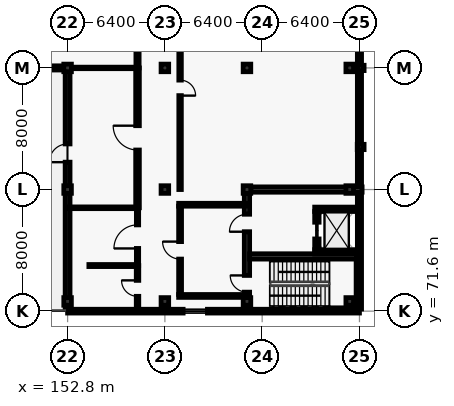
"""IFC4 building model, lengths in metres.
Left out: names, types, materials, properties, quantities, classifications, styles, units other than length and angle.
Written with IfcOpenShell. Run it as: python <this file> out.ifc"""

import sys

from ifc_helpers import new_model, si_unit, direction, frame, frame_2d, origin, origin_2d, place, context, subcontext, project, spatial, rectangle, extrude, element, fill, save


model = new_model("IFC4")
c1 = context("Model", 3, precision=1e-05, world=origin(), true_north=direction((0.0, 1.0)))
c2 = subcontext(c1, "Body", "Model", "MODEL_VIEW")
j1 = project(units=[si_unit("LENGTHUNIT", "METRE"), si_unit("PLANEANGLEUNIT", "RADIAN")], contexts=[c1])
p1 = place(None, origin())
s1 = spatial("IfcSite", under=j1, at=p1, CompositionType="ELEMENT")
p2 = place(p1, origin())
s2 = spatial("IfcBuilding", under=s1, at=p2, CompositionType="ELEMENT")
p3 = place(p2, frame((0.0, 0.0, 20.4)))
s3 = spatial("IfcBuildingStorey", under=s2, at=p3, CompositionType="ELEMENT", Elevation=20.4)
for number, where, z_axis, x_axis in (
    (1, (152.8, 72.24, 0.0), (0.0, 0.0, 1.0), (1.0, 0.0, 0.0)),
    (2, (152.8, 79.6, 0.0), (0.0, 0.0, 1.0), (1.0, 0.0, 0.0)),
    (3, (152.8, 87.6, 0.0), (0.0, 0.0, 1.0), (1.0, 0.0, 0.0)),
    (4, (159.2, 72.24, 0.0), (0.0, 0.0, 1.0), (1.0, 0.0, 0.0)),
    (5, (159.2, 79.6, 0.0), (0.0, 0.0, 1.0), (1.0, 0.0, 0.0)),
    (6, (159.2, 87.6, 0.0), (0.0, 0.0, 1.0), (1.0, 0.0, 0.0)),
    (7, (164.6, 72.24, 0.0), (0.0, 0.0, 1.0), (1.0, 0.0, 0.0)),
    (8, (164.6, 79.6, 0.0), (0.0, 0.0, 1.0), (1.0, 0.0, 0.0)),
    (9, (164.6, 87.6, 0.0), (0.0, 0.0, 1.0), (1.0, 0.0, 0.0)),
    (10, (171.36, 72.24, 0.0), (0.0, 0.0, 1.0), (1.0, 0.0, 0.0)),
    (11, (171.36, 79.6, 0.0), (0.0, 0.0, 1.0), (1.0, 0.0, 0.0)),
    (12, (171.36, 87.6, 0.0), (0.0, 0.0, 1.0), (1.0, 0.0, 0.0)),
):
    element("IfcColumn", number, at=place(p3, frame(where, z_axis=z_axis, x_axis=x_axis)), inside=s3, PredefinedType="COLUMN", context=c2, shape_type="SweptSolid", body=[
        extrude(rectangle(XDim=0.5, YDim=0.5, at=origin_2d()), origin(), (0.0, 0.0, 1.0), 4.5),
    ])
for number, where, z_axis, x_axis in (
    (13, (172.08, 82.4, 0.0), (0.0, 0.0, 1.0), (1.0, 0.0, 0.0)),
    (14, (172.08, 87.6, 0.0), (0.0, 0.0, 1.0), (1.0, 0.0, 0.0)),
):
    element("IfcColumn", number, at=place(p3, frame(where, z_axis=z_axis, x_axis=x_axis)), inside=s3, PredefinedType="PILASTER", context=c2, shape_type="SweptSolid", body=[
        extrude(rectangle(XDim=0.35, YDim=0.45, at=origin_2d()), origin(), (0.0, 0.0, 1.0), 4.5),
    ])
p4 = place(p3, frame((152.8, 87.6, 0.0), z_axis=(0.0, 0.0, 1.0), x_axis=(-1.0, 0.0, 0.0)))
e15 = element("IfcWall", 15, at=p4, inside=s3, PredefinedType="SOLIDWALL", context=c2, shape_type="SweptSolid", body=[
    extrude(rectangle(XDim=6.6, YDim=0.275, at=frame_2d((3.3, 0.0))), origin(), (0.0, 0.0, 1.0), 3.65),
])
p5 = place(p3, frame((172.0, 117.86, 0.0), z_axis=(0.0, 0.0, 1.0), x_axis=(0.0, -1.0, 0.0)))
e16 = element("IfcWall", 16, at=p5, inside=s3, PredefinedType="SOLIDWALL", context=c2, shape_type="SweptSolid", body=[
    extrude(rectangle(XDim=46.12, YDim=0.275, at=frame_2d((23.06, 0.0))), origin(), (0.0, 0.0, 1.0), 4.3),
])
p6 = place(p3, frame((172.0, 71.6, 0.0), z_axis=(0.0, 0.0, 1.0), x_axis=(-1.0, 0.0, 0.0)))
e17 = element("IfcWall", 17, at=p6, inside=s3, PredefinedType="SOLIDWALL", context=c2, shape_type="SweptSolid", body=[
    extrude(rectangle(XDim=19.2, YDim=0.25, at=frame_2d((9.6, 0.0))), origin(), (0.0, 0.0, 1.0), 4.3),
])
p7 = place(p6, frame((10.0, 0.0, 0.8)))
e18 = element("IfcOpeningElement", 18, at=p7, cuts=e17, PredefinedType="OPENING", context=c2, shape_type="SweptSolid", body=[
    extrude(rectangle(XDim=1.6, YDim=2.75, at=frame_2d((0.8, 1.375))), frame((0.0, 0.135, 0.0), z_axis=(0.0, -1.0, 0.0), x_axis=(1.0, 0.0, 0.0)), (0.0, 0.0, 1.0), 0.27),
])
p8 = place(p3, frame((152.8, 71.74, 0.0), z_axis=(0.0, 0.0, 1.0), x_axis=(0.0, 1.0, 0.0)))
e19 = element("IfcWall", 19, at=p8, inside=s3, PredefinedType="SOLIDWALL", context=c2, shape_type="SweptSolid", body=[
    extrude(rectangle(XDim=15.72, YDim=0.32, at=frame_2d((7.86, 0.0))), origin(), (0.0, 0.0, 1.0), 3.45),
])
p9 = place(p8, frame((9.66, 0.0, 0.0)))
e20 = element("IfcOpeningElement", 20, at=p9, cuts=e19, PredefinedType="OPENING", context=c2, shape_type="SweptSolid", body=[
    extrude(rectangle(XDim=1.2, YDim=2.2, at=frame_2d((0.6, 1.1))), frame((0.0, 0.17, 0.0), z_axis=(0.0, -1.0, 0.0), x_axis=(1.0, 0.0, 0.0)), (0.0, 0.0, 1.0), 0.34),
])
p10 = place(p3, frame((164.852, 79.6, 0.0), z_axis=(0.0, 0.0, 1.0), x_axis=(1.0, 0.0, 0.0)))
e21 = element("IfcWall", 21, at=p10, inside=s3, PredefinedType="SHEAR", context=c2, shape_type="SweptSolid", body=[
    extrude(rectangle(XDim=7.323, YDim=0.35, at=frame_2d((3.662, 0.0))), origin(), (0.0, 0.0, 1.0), 4.3),
])
p11 = place(p3, frame((164.6, 71.775, 0.0), z_axis=(0.0, 0.0, 1.0), x_axis=(0.0, 1.0, 0.0)))
e22 = element("IfcWall", 22, at=p11, inside=s3, PredefinedType="SHEAR", context=c2, shape_type="SweptSolid", body=[
    extrude(rectangle(XDim=7.573, YDim=0.35, at=frame_2d((3.787, 0.0))), origin(), (0.0, 0.0, 1.0), 4.3),
])
p12 = place(p11, frame((1.075, 0.0, 0.0)))
e23 = element("IfcOpeningElement", 23, at=p12, cuts=e22, PredefinedType="OPENING", context=c2, shape_type="SweptSolid", body=[
    extrude(rectangle(XDim=1.1, YDim=2.15, at=frame_2d((0.55, 1.075))), frame((0.0, 0.185, 0.0), z_axis=(0.0, -1.0, 0.0), x_axis=(1.0, 0.0, 0.0)), (0.0, 0.0, 1.0), 0.37),
])
p13 = place(p11, frame((5.05, 0.0, 0.0)))
e24 = element("IfcOpeningElement", 24, at=p13, cuts=e22, PredefinedType="OPENING", context=c2, shape_type="SweptSolid", body=[
    extrude(rectangle(XDim=1.15, YDim=2.2, at=frame_2d((0.575, 1.1))), frame((0.0, 0.185, 0.0), z_axis=(0.0, -1.0, 0.0), x_axis=(1.0, 0.0, 0.0)), (0.0, 0.0, 1.0), 0.37),
])
p14 = place(p3, frame((164.775, 75.2, 0.0), z_axis=(0.0, 0.0, 1.0), x_axis=(1.0, 0.0, 0.0)))
e25 = element("IfcWall", 25, at=p14, inside=s3, PredefinedType="SHEAR", context=c2, shape_type="SweptSolid", body=[
    extrude(rectangle(XDim=7.05, YDim=0.35, at=frame_2d((3.525, 0.0))), origin(), (0.0, 0.0, 1.0), 4.3),
])
for number, where, z_axis, x_axis in (
    (26, (169.055, 75.5, 0.0), (0.0, 0.0, 1.0), (1.0, 0.0, 0.0)),
    (27, (169.055, 78.3, 0.0), (0.0, 0.0, 1.0), (1.0, 0.0, 0.0)),
):
    element("IfcWall", number, at=place(p3, frame(where, z_axis=z_axis, x_axis=x_axis)), inside=s3, PredefinedType="SHEAR", context=c2, shape_type="SweptSolid", body=[
        extrude(rectangle(XDim=2.89, YDim=0.29, at=frame_2d((1.445, 0.0))), origin(), (0.0, 0.0, 1.0), 4.3),
    ])
p15 = place(p3, frame((169.2, 75.645, 0.0), z_axis=(0.0, 0.0, 1.0), x_axis=(0.0, 1.0, 0.0)))
e28 = element("IfcWall", 28, at=p15, inside=s3, PredefinedType="SHEAR", context=c2, shape_type="SweptSolid", body=[
    extrude(rectangle(XDim=2.51, YDim=0.29, at=frame_2d((1.255, 0.0))), origin(), (0.0, 0.0, 1.0), 4.3),
])
p16 = place(p15, frame((0.705, 0.0, 0.0)))
e29 = element("IfcOpeningElement", 29, at=p16, cuts=e28, PredefinedType="OPENING", context=c2, shape_type="SweptSolid", body=[
    extrude(rectangle(XDim=1.1, YDim=2.15, at=frame_2d((0.55, 1.075))), frame((0.0, 0.155, 0.0), z_axis=(0.0, -1.0, 0.0), x_axis=(1.0, 0.0, 0.0)), (0.0, 0.0, 1.0), 0.31),
])
p17 = place(p3, frame((160.105, 72.6, 0.0), z_axis=(0.0, 0.0, 1.0), x_axis=(1.0, 0.0, 0.0)))
e30 = element("IfcWall", 30, at=p17, inside=s3, PredefinedType="PARTITIONING", context=c2, shape_type="SweptSolid", body=[
    extrude(rectangle(XDim=4.495, YDim=0.19, at=frame_2d((2.248, 0.0))), origin(), (0.0, 0.0, 1.0), 3.65),
])
p18 = place(p3, frame((160.105, 78.6, 0.0), z_axis=(0.0, 0.0, 1.0), x_axis=(1.0, 0.0, 0.0)))
e31 = element("IfcWall", 31, at=p18, inside=s3, PredefinedType="PARTITIONING", context=c2, shape_type="SweptSolid", body=[
    extrude(rectangle(XDim=4.495, YDim=0.19, at=frame_2d((2.248, 0.0))), origin(), (0.0, 0.0, 1.0), 4.3),
])
p19 = place(p3, frame((160.2, 72.695, 0.0), z_axis=(0.0, 0.0, 1.0), x_axis=(0.0, 1.0, 0.0)))
e32 = element("IfcWall", 32, at=p19, inside=s3, PredefinedType="PARTITIONING", context=c2, shape_type="SweptSolid", body=[
    extrude(rectangle(XDim=5.81, YDim=0.19, at=frame_2d((2.905, 0.0))), origin(), (0.0, 0.0, 1.0), 4.3),
])
p20 = place(p19, frame((2.33, 0.0, 0.0)))
e33 = element("IfcOpeningElement", 33, at=p20, cuts=e32, PredefinedType="OPENING", context=c2, shape_type="SweptSolid", body=[
    extrude(rectangle(XDim=1.15, YDim=2.2, at=frame_2d((0.575, 1.1))), frame((0.0, 0.105, 0.0), z_axis=(0.0, -1.0, 0.0), x_axis=(1.0, 0.0, 0.0)), (0.0, 0.0, 1.0), 0.21),
])
p21 = place(p3, frame((157.4, 71.6, 0.0), z_axis=(0.0, 0.0, 1.0), x_axis=(0.0, 1.0, 0.0)))
e34 = element("IfcWall", 34, at=p21, inside=s3, PredefinedType="PARTITIONING", context=c2, shape_type="SweptSolid", body=[
    extrude(rectangle(XDim=3.0, YDim=0.165, at=frame_2d((1.5, 0.0))), origin(), (0.0, 0.0, 1.0), 4.3),
])
p22 = place(p21, frame((0.975, 0.0, 0.0)))
e35 = element("IfcOpeningElement", 35, at=p22, cuts=e34, PredefinedType="OPENING", context=c2, shape_type="SweptSolid", body=[
    extrude(rectangle(XDim=1.05, YDim=2.15, at=frame_2d((0.525, 1.075))), frame((0.0, 0.093, 0.0), z_axis=(0.0, -1.0, 0.0), x_axis=(1.0, 0.0, 0.0)), (0.0, 0.0, 1.0), 0.185),
])
p23 = place(p3, frame((157.4, 74.6, 0.0), z_axis=(0.0, 0.0, 1.0), x_axis=(0.0, 1.0, 0.0)))
e36 = element("IfcWall", 36, at=p23, inside=s3, PredefinedType="PARTITIONING", context=c2, shape_type="SweptSolid", body=[
    extrude(rectangle(XDim=3.8, YDim=0.15, at=frame_2d((1.9, 0.0))), origin(), (0.0, 0.0, 1.0), 4.3),
])
p24 = place(p23, frame((1.125, 0.0, 0.0)))
e37 = element("IfcOpeningElement", 37, at=p24, cuts=e36, PredefinedType="OPENING", context=c2, shape_type="SweptSolid", body=[
    extrude(rectangle(XDim=1.55, YDim=2.25, at=frame_2d((0.775, 1.125))), frame((0.0, 0.085, 0.0), z_axis=(0.0, -1.0, 0.0), x_axis=(1.0, 0.0, 0.0)), (0.0, 0.0, 1.0), 0.17),
])
p25 = place(p3, frame((157.4, 78.4, 0.0), z_axis=(0.0, 0.0, 1.0), x_axis=(0.0, 1.0, 0.0)))
e38 = element("IfcWall", 38, at=p25, inside=s3, PredefinedType="PARTITIONING", context=c2, shape_type="SweptSolid", body=[
    extrude(rectangle(XDim=9.2, YDim=0.24, at=frame_2d((4.6, 0.0))), origin(), (0.0, 0.0, 1.0), 4.3),
])
p26 = place(p25, frame((3.8, 0.0, 0.0)))
e39 = element("IfcOpeningElement", 39, at=p26, cuts=e38, PredefinedType="OPENING", context=c2, shape_type="SweptSolid", body=[
    extrude(rectangle(XDim=1.6, YDim=2.3, at=frame_2d((0.8, 1.15))), frame((0.0, 0.13, 0.0), z_axis=(0.0, -1.0, 0.0), x_axis=(1.0, 0.0, 0.0)), (0.0, 0.0, 1.0), 0.26),
])
p27 = place(p3, frame((157.4, 87.6, 0.0), z_axis=(0.0, 0.0, 1.0), x_axis=(0.0, 1.0, 0.0)))
e40 = element("IfcWall", 40, at=p27, inside=s3, PredefinedType="PARTITIONING", context=c2, shape_type="SweptSolid", body=[
    extrude(rectangle(XDim=15.4, YDim=0.21, at=frame_2d((7.7, 0.0))), origin(), (0.0, 0.0, 1.0), 4.3),
])
p28 = place(p27, frame((7.24, 0.0, 0.0)))
e41 = element("IfcOpeningElement", 41, at=p28, cuts=e40, PredefinedType="OPENING", context=c2, shape_type="SweptSolid", body=[
    extrude(rectangle(XDim=0.92, YDim=2.1, at=frame_2d((0.46, 1.05))), frame((0.0, 0.115, 0.0), z_axis=(0.0, -1.0, 0.0), x_axis=(1.0, 0.0, 0.0)), (0.0, 0.0, 1.0), 0.23),
])
p29 = place(p3, frame((160.2, 110.0, 0.0), z_axis=(0.0, 0.0, 1.0), x_axis=(0.0, -1.0, 0.0)))
e42 = element("IfcWall", 42, at=p29, inside=s3, PredefinedType="PARTITIONING", context=c2, shape_type="SweptSolid", body=[
    extrude(rectangle(XDim=30.4, YDim=0.165, at=frame_2d((15.2, 0.0))), origin(), (0.0, 0.0, 1.0), 4.3),
])
p30 = place(p29, frame((14.58, 0.0, 0.0)))
e43 = element("IfcOpeningElement", 43, at=p30, cuts=e42, PredefinedType="OPENING", context=c2, shape_type="SweptSolid", body=[
    extrude(rectangle(XDim=1.02, YDim=2.1, at=frame_2d((0.51, 1.05))), frame((0.0, 0.093, 0.0), z_axis=(0.0, -1.0, 0.0), x_axis=(1.0, 0.0, 0.0)), (0.0, 0.0, 1.0), 0.185),
])
p31 = place(p29, frame((23.202, 0.0, 0.0)))
e44 = element("IfcOpeningElement", 44, at=p31, cuts=e42, PredefinedType="OPENING", context=c2, shape_type="SweptSolid", body=[
    extrude(rectangle(XDim=1.02, YDim=2.1, at=frame_2d((0.51, 1.05))), frame((0.0, 0.093, 0.0), z_axis=(0.0, -1.0, 0.0), x_axis=(1.0, 0.0, 0.0)), (0.0, 0.0, 1.0), 0.185),
])
p32 = place(p3, frame((154.2, 74.6, 0.0), z_axis=(0.0, 0.0, 1.0), x_axis=(1.0, 0.0, 0.0)))
e45 = element("IfcWall", 45, at=p32, inside=s3, PredefinedType="PARTITIONING", context=c2, shape_type="SweptSolid", body=[
    extrude(rectangle(XDim=3.2, YDim=0.135, at=frame_2d((1.6, 0.0))), origin(), (0.0, 0.0, 1.0), 4.3),
])
p33 = place(p3, frame((152.8, 78.4, 0.0), z_axis=(0.0, 0.0, 1.0), x_axis=(1.0, 0.0, 0.0)))
e46 = element("IfcWall", 46, at=p33, inside=s3, PredefinedType="PARTITIONING", context=c2, shape_type="SweptSolid", body=[
    extrude(rectangle(XDim=4.6, YDim=0.115, at=frame_2d((2.3, 0.0))), origin(), (0.0, 0.0, 1.0), 4.3),
])
p34 = place(p3, frame((153.052, 87.6, 0.0), z_axis=(0.0, 0.0, 1.0), x_axis=(1.0, 0.0, 0.0)))
e47 = element("IfcWall", 47, at=p34, inside=s3, PredefinedType="PARTITIONING", context=c2, shape_type="SweptSolid", body=[
    extrude(rectangle(XDim=4.348, YDim=0.1, at=frame_2d((2.174, 0.0))), origin(), (0.0, 0.0, 1.0), 3.65),
])
p35 = place(p9, origin())
e48 = element("IfcDoor", 48, at=p35, inside=s3, OperationType="SINGLE_SWING_LEFT", PredefinedType="DOOR", context=c2, shape_type="SweptSolid", body=[
    extrude(rectangle(XDim=1.2, YDim=2.2, at=frame_2d((0.6, 1.1))), frame((0.0, 0.025, 0.0), z_axis=(0.0, -1.0, 0.0), x_axis=(1.0, 0.0, 0.0)), (0.0, 0.0, 1.0), 0.05),
])
fill(e20, e48)
p36 = place(p7, origin())
e49 = element("IfcWindow", 49, at=p36, inside=s3, PartitioningType="SINGLE_PANEL", PredefinedType="WINDOW", context=c2, shape_type="SweptSolid", body=[
    extrude(rectangle(XDim=1.6, YDim=2.75, at=frame_2d((0.8, 1.375))), frame((0.0, 0.03, 0.0), z_axis=(0.0, -1.0, 0.0), x_axis=(1.0, 0.0, 0.0)), (0.0, 0.0, 1.0), 0.06),
])
fill(e18, e49)
p37 = place(p12, origin())
e50 = element("IfcDoor", 50, at=p37, inside=s3, OperationType="SINGLE_SWING_RIGHT", PredefinedType="DOOR", context=c2, shape_type="SweptSolid", body=[
    extrude(rectangle(XDim=1.1, YDim=2.15, at=frame_2d((0.55, 1.075))), frame((0.0, 0.025, 0.0), z_axis=(0.0, -1.0, 0.0), x_axis=(1.0, 0.0, 0.0)), (0.0, 0.0, 1.0), 0.05),
])
fill(e23, e50)
p38 = place(p13, origin())
e51 = element("IfcDoor", 51, at=p38, inside=s3, OperationType="SINGLE_SWING_LEFT", PredefinedType="DOOR", context=c2, shape_type="SweptSolid", body=[
    extrude(rectangle(XDim=1.15, YDim=2.2, at=frame_2d((0.575, 1.1))), frame((0.0, 0.025, 0.0), z_axis=(0.0, -1.0, 0.0), x_axis=(1.0, 0.0, 0.0)), (0.0, 0.0, 1.0), 0.05),
])
fill(e24, e51)
p39 = place(p16, origin())
e52 = element("IfcDoor", 52, at=p39, inside=s3, OperationType="SLIDING_TO_LEFT", PredefinedType="DOOR", context=c2, shape_type="SweptSolid", body=[
    extrude(rectangle(XDim=1.1, YDim=2.15, at=frame_2d((0.55, 1.075))), frame((0.0, 0.025, 0.0), z_axis=(0.0, -1.0, 0.0), x_axis=(1.0, 0.0, 0.0)), (0.0, 0.0, 1.0), 0.05),
])
fill(e29, e52)
p40 = place(p20, origin())
e53 = element("IfcDoor", 53, at=p40, inside=s3, OperationType="SINGLE_SWING_RIGHT", PredefinedType="DOOR", context=c2, shape_type="SweptSolid", body=[
    extrude(rectangle(XDim=1.15, YDim=2.2, at=frame_2d((0.575, 1.1))), frame((0.0, 0.025, 0.0), z_axis=(0.0, -1.0, 0.0), x_axis=(1.0, 0.0, 0.0)), (0.0, 0.0, 1.0), 0.05),
])
fill(e33, e53)
p41 = place(p22, origin())
e54 = element("IfcDoor", 54, at=p41, inside=s3, OperationType="SINGLE_SWING_RIGHT", PredefinedType="DOOR", context=c2, shape_type="SweptSolid", body=[
    extrude(rectangle(XDim=1.05, YDim=2.15, at=frame_2d((0.525, 1.075))), frame((0.0, 0.025, 0.0), z_axis=(0.0, -1.0, 0.0), x_axis=(1.0, 0.0, 0.0)), (0.0, 0.0, 1.0), 0.05),
])
fill(e35, e54)
p42 = place(p24, origin())
e55 = element("IfcDoor", 55, at=p42, inside=s3, OperationType="SINGLE_SWING_LEFT", PredefinedType="DOOR", context=c2, shape_type="SweptSolid", body=[
    extrude(rectangle(XDim=1.55, YDim=2.25, at=frame_2d((0.775, 1.125))), frame((0.0, 0.025, 0.0), z_axis=(0.0, -1.0, 0.0), x_axis=(1.0, 0.0, 0.0)), (0.0, 0.0, 1.0), 0.05),
])
fill(e37, e55)
p43 = place(p26, origin())
e56 = element("IfcDoor", 56, at=p43, inside=s3, OperationType="SINGLE_SWING_RIGHT", PredefinedType="DOOR", context=c2, shape_type="SweptSolid", body=[
    extrude(rectangle(XDim=1.6, YDim=2.3, at=frame_2d((0.8, 1.15))), frame((0.0, 0.025, 0.0), z_axis=(0.0, -1.0, 0.0), x_axis=(1.0, 0.0, 0.0)), (0.0, 0.0, 1.0), 0.05),
])
fill(e39, e56)
p44 = place(p31, origin())
e57 = element("IfcDoor", 57, at=p44, inside=s3, OperationType="SINGLE_SWING_RIGHT", PredefinedType="DOOR", context=c2, shape_type="SweptSolid", body=[
    extrude(rectangle(XDim=1.02, YDim=2.1, at=frame_2d((0.51, 1.05))), frame((0.0, 0.025, 0.0), z_axis=(0.0, -1.0, 0.0), x_axis=(1.0, 0.0, 0.0)), (0.0, 0.0, 1.0), 0.05),
])
fill(e44, e57)
save(model, sys.argv[1])
